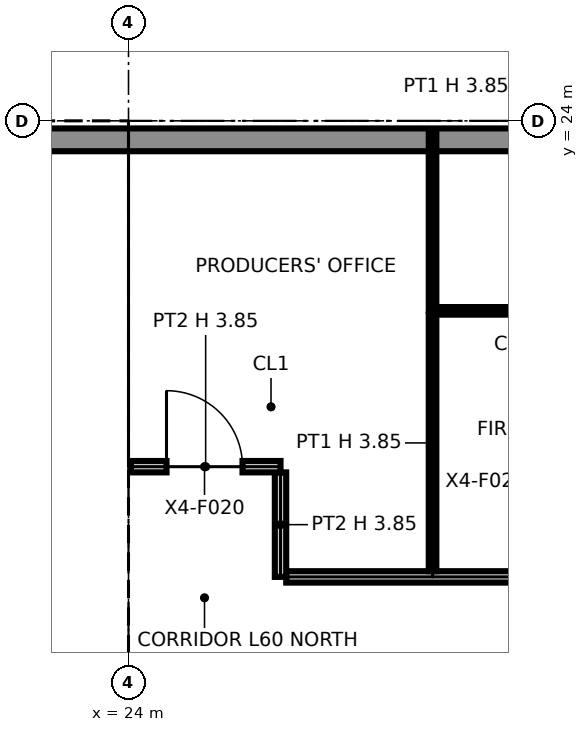
"""IFC4 building model, lengths in metres.
Left out: names, types, materials, properties, quantities, classifications, styles, units other than length and angle.
Written with IfcOpenShell. Run it as: python <this file> out.ifc"""

import sys

from ifc_helpers import new_model, si_unit, direction, frame, frame_2d, origin, origin_2d, place, context, subcontext, project, spatial, polyline, rectangle, i_section, outline, extrude, element, fill, save


model = new_model("IFC4")
c1 = context("Model", 3, precision=1e-05, world=origin(), true_north=direction((0.0, 1.0)))
c2 = subcontext(c1, "Body", "Model", "MODEL_VIEW")
j1 = project(units=[si_unit("LENGTHUNIT", "METRE"), si_unit("PLANEANGLEUNIT", "RADIAN")], contexts=[c1])
p1 = place(None, origin())
s1 = spatial("IfcSite", under=j1, at=p1, CompositionType="ELEMENT")
p2 = place(p1, origin())
s2 = spatial("IfcBuilding", under=s1, at=p2, CompositionType="ELEMENT")
p3 = place(p2, frame((0.0, 0.0, 275.0)))
s3 = spatial("IfcBuildingStorey", under=s2, at=p3, CompositionType="ELEMENT", Elevation=275.0)
p4 = place(p3, frame((24.0, 24.0, 0.0), z_axis=(0.0, 0.0, 1.0), x_axis=(1.0, 0.0, 0.0)))
e1 = element("IfcColumn", 1, at=p4, inside=s3, PredefinedType="COLUMN", context=c2, shape_type="SweptSolid", body=[
    extrude(i_section(OverallWidth=0.399, OverallDepth=0.386, WebThickness=0.021, FlangeThickness=0.033, at=origin_2d()), origin(), (0.0, 0.0, 1.0), 3.85),
])
p5 = place(p3, frame((32.0, 23.75, 0.0), z_axis=(0.0, 0.0, 1.0), x_axis=(-1.0, 0.0, 0.0)))
e2 = element("IfcWall", 2, at=p5, inside=s3, PredefinedType="SOLIDWALL", context=c2, shape_type="SweptSolid", body=[
    extrude(rectangle(XDim=25.9, YDim=0.3, at=frame_2d((12.95, 0.0))), origin(), (0.0, 0.0, 1.0), 3.85),
])
p6 = place(p3, frame((8.65, 23.25, 0.0), z_axis=(0.0, 0.0, 1.0), x_axis=(1.0, 0.0, 0.0)))
e3 = element("IfcWall", 3, at=p6, inside=s3, PredefinedType="PARTITIONING", context=c2, shape_type="SweptSolid", body=[
    extrude(outline(polyline([(0.0, 0.0), (14.7, 0.0), (14.7, 3.85), (7.438, 3.85), (7.437, 3.318), (7.263, 3.318), (7.262, 3.85), (0.0, 3.85), (0.0, 0.0)])), frame((0.0, 0.1, 0.0), z_axis=(0.0, -1.0, 0.0), x_axis=(1.0, 0.0, 0.0)), (0.0, 0.0, 1.0), 0.2),
])
p7 = place(p3, frame((8.85, 19.9, 0.0), z_axis=(0.0, 0.0, 1.0), x_axis=(1.0, 0.0, 0.0)))
e4 = element("IfcWall", 4, at=p7, inside=s3, PredefinedType="PARTITIONING", context=c2, shape_type="SweptSolid", body=[
    extrude(outline(polyline([(0.0, 0.0), (14.3, 0.0), (14.3, 3.85), (7.238, 3.85), (7.237, 3.318), (7.063, 3.318), (7.062, 3.85), (0.0, 3.85), (0.0, 0.0)])), frame((0.0, 0.1, 0.0), z_axis=(0.0, -1.0, 0.0), x_axis=(1.0, 0.0, 0.0)), (0.0, 0.0, 1.0), 0.2),
])
p8 = place(p7, frame((2.125, 0.0, 0.0)))
e5 = element("IfcOpeningElement", 5, at=p8, cuts=e4, PredefinedType="OPENING", context=c2, shape_type="SweptSolid", body=[
    extrude(rectangle(XDim=0.9, YDim=2.1, at=frame_2d((0.45, 1.05))), frame((0.0, 0.11, 0.0), z_axis=(0.0, -1.0, 0.0), x_axis=(1.0, 0.0, 0.0)), (0.0, 0.0, 1.0), 0.22),
])
p9 = place(p7, frame((5.65, 0.0, 0.0)))
e6 = element("IfcOpeningElement", 6, at=p9, cuts=e4, PredefinedType="OPENING", context=c2, shape_type="SweptSolid", body=[
    extrude(rectangle(XDim=1.1, YDim=2.1, at=frame_2d((0.55, 1.05))), frame((0.0, 0.11, 0.0), z_axis=(0.0, -1.0, 0.0), x_axis=(1.0, 0.0, 0.0)), (0.0, 0.0, 1.0), 0.22),
])
p10 = place(p7, frame((7.95, 0.0, 0.0)))
e7 = element("IfcOpeningElement", 7, at=p10, cuts=e4, PredefinedType="OPENING", context=c2, shape_type="SweptSolid", body=[
    extrude(rectangle(XDim=1.1, YDim=2.1, at=frame_2d((0.55, 1.05))), frame((0.0, 0.11, 0.0), z_axis=(0.0, -1.0, 0.0), x_axis=(1.0, 0.0, 0.0)), (0.0, 0.0, 1.0), 0.22),
])
p11 = place(p7, frame((10.25, 0.0, 0.0)))
e8 = element("IfcOpeningElement", 8, at=p11, cuts=e4, PredefinedType="OPENING", context=c2, shape_type="SweptSolid", body=[
    extrude(rectangle(XDim=1.1, YDim=2.1, at=frame_2d((0.55, 1.05))), frame((0.0, 0.11, 0.0), z_axis=(0.0, -1.0, 0.0), x_axis=(1.0, 0.0, 0.0)), (0.0, 0.0, 1.0), 0.22),
])
p12 = place(p7, frame((12.625, 0.0, 0.0)))
e9 = element("IfcOpeningElement", 9, at=p12, cuts=e4, PredefinedType="OPENING", context=c2, shape_type="SweptSolid", body=[
    extrude(rectangle(XDim=1.1, YDim=2.1, at=frame_2d((0.55, 1.05))), frame((0.0, 0.11, 0.0), z_axis=(0.0, -1.0, 0.0), x_axis=(1.0, 0.0, 0.0)), (0.0, 0.0, 1.0), 0.22),
])
p13 = place(p3, frame((23.25, 8.85, 0.0), z_axis=(0.0, 0.0, 1.0), x_axis=(0.0, 1.0, 0.0)))
e10 = element("IfcWall", 10, at=p13, inside=s3, PredefinedType="PARTITIONING", context=c2, shape_type="SweptSolid", body=[
    extrude(outline(polyline([(0.0, 0.0), (14.3, 0.0), (14.3, 3.85), (10.225, 3.85), (10.224, 3.44), (10.076, 3.44), (10.075, 3.85), (7.238, 3.85), (7.237, 3.318), (7.063, 3.318), (7.062, 3.85), (5.225, 3.85), (5.224, 3.44), (5.076, 3.44), (5.075, 3.85), (0.0, 3.85), (0.0, 0.0)])), frame((0.0, 0.1, 0.0), z_axis=(0.0, -1.0, 0.0), x_axis=(1.0, 0.0, 0.0)), (0.0, 0.0, 1.0), 0.2),
])
p14 = place(p13, frame((8.3, 0.0, 0.0)))
e11 = element("IfcOpeningElement", 11, at=p14, cuts=e10, PredefinedType="OPENING", context=c2, shape_type="SweptSolid", body=[
    extrude(rectangle(XDim=1.8, YDim=2.1, at=frame_2d((0.9, 1.05))), frame((0.0, 0.11, 0.0), z_axis=(0.0, -1.0, 0.0), x_axis=(1.0, 0.0, 0.0)), (0.0, 0.0, 1.0), 0.22),
])
p15 = place(p3, frame((26.075, 18.0, 0.0), z_axis=(0.0, 0.0, 1.0), x_axis=(1.0, 0.0, 0.0)))
e12 = element("IfcWall", 12, at=p15, inside=s3, PredefinedType="PARTITIONING", context=c2, shape_type="SweptSolid", body=[
    extrude(rectangle(XDim=12.475, YDim=0.15, at=frame_2d((6.238, 0.0))), origin(), (0.0, 0.0, 1.0), 3.85),
])
p16 = place(p15, frame((7.425, 0.0, 0.0)))
e13 = element("IfcOpeningElement", 13, at=p16, cuts=e12, PredefinedType="OPENING", context=c2, shape_type="SweptSolid", body=[
    extrude(rectangle(XDim=1.0, YDim=2.1, at=frame_2d((0.5, 1.05))), frame((0.0, 0.085, 0.0), z_axis=(0.0, -1.0, 0.0), x_axis=(1.0, 0.0, 0.0)), (0.0, 0.0, 1.0), 0.17),
])
p17 = place(p15, frame((10.7, 0.0, 0.0)))
e14 = element("IfcOpeningElement", 14, at=p17, cuts=e12, PredefinedType="OPENING", context=c2, shape_type="SweptSolid", body=[
    extrude(rectangle(XDim=1.0, YDim=2.1, at=frame_2d((0.5, 1.05))), frame((0.0, 0.085, 0.0), z_axis=(0.0, -1.0, 0.0), x_axis=(1.0, 0.0, 0.0)), (0.0, 0.0, 1.0), 0.17),
])
p18 = place(p15, frame((3.425, 0.0, 0.0)))
e15 = element("IfcOpeningElement", 15, at=p18, cuts=e12, PredefinedType="OPENING", context=c2, shape_type="SweptSolid", body=[
    extrude(rectangle(XDim=1.0, YDim=2.1, at=frame_2d((0.5, 1.05))), frame((0.0, 0.085, 0.0), z_axis=(0.0, -1.0, 0.0), x_axis=(1.0, 0.0, 0.0)), (0.0, 0.0, 1.0), 0.17),
])
p19 = place(p3, frame((26.0, 18.0, 0.0), z_axis=(0.0, 0.0, 1.0), x_axis=(0.0, 1.0, 0.0)))
e16 = element("IfcWall", 16, at=p19, inside=s3, PredefinedType="PARTITIONING", context=c2, shape_type="SweptSolid", body=[
    extrude(rectangle(XDim=1.375, YDim=0.15, at=frame_2d((0.688, 0.0))), origin(), (0.0, 0.0, 1.0), 3.85),
])
p20 = place(p3, frame((28.0, 18.075, 0.0), z_axis=(0.0, 0.0, 1.0), x_axis=(0.0, 1.0, 0.0)))
e17 = element("IfcWall", 17, at=p20, inside=s3, PredefinedType="PARTITIONING", context=c2, shape_type="SweptSolid", body=[
    extrude(outline(polyline([(0.0, 0.0), (3.375, 0.0), (3.375, 3.85), (2.225, 3.85), (2.223, 3.238), (1.627, 3.238), (1.625, 3.85), (0.0, 3.85), (0.0, 0.0)])), frame((0.0, 0.05, 0.0), z_axis=(0.0, -1.0, 0.0), x_axis=(1.0, 0.0, 0.0)), (0.0, 0.0, 1.0), 0.1),
])
p21 = place(p3, frame((24.03, 19.45, 0.0), z_axis=(0.0, 0.0, 1.0), x_axis=(1.0, 0.0, 0.0)))
e18 = element("IfcWall", 18, at=p21, inside=s3, PredefinedType="PARTITIONING", context=c2, shape_type="SweptSolid", body=[
    extrude(rectangle(XDim=1.97, YDim=0.15, at=frame_2d((0.985, 0.0))), origin(), (0.0, 0.0, 1.0), 3.85),
])
p22 = place(p21, frame((0.47, 0.0, 0.0)))
e19 = element("IfcOpeningElement", 19, at=p22, cuts=e18, PredefinedType="OPENING", context=c2, shape_type="SweptSolid", body=[
    extrude(rectangle(XDim=1.0, YDim=2.1, at=frame_2d((0.5, 1.05))), frame((0.0, 0.085, 0.0), z_axis=(0.0, -1.0, 0.0), x_axis=(1.0, 0.0, 0.0)), (0.0, 0.0, 1.0), 0.17),
])
p23 = place(p3, frame((28.05, 21.5, 0.0), z_axis=(0.0, 0.0, 1.0), x_axis=(1.0, 0.0, 0.0)))
e20 = element("IfcWall", 20, at=p23, inside=s3, PredefinedType="PARTITIONING", context=c2, shape_type="SweptSolid", body=[
    extrude(rectangle(XDim=3.92, YDim=0.1, at=frame_2d((1.96, 0.0))), origin(), (0.0, 0.0, 1.0), 3.85),
])
p24 = place(p23, frame((1.45, 0.0, 0.0)))
e21 = element("IfcOpeningElement", 21, at=p24, cuts=e20, PredefinedType="OPENING", context=c2, shape_type="SweptSolid", body=[
    extrude(rectangle(XDim=1.0, YDim=2.1, at=frame_2d((0.5, 1.05))), frame((0.0, 0.06, 0.0), z_axis=(0.0, -1.0, 0.0), x_axis=(1.0, 0.0, 0.0)), (0.0, 0.0, 1.0), 0.12),
])
p25 = place(p3, frame((28.0, 21.5, 0.0), z_axis=(0.0, 0.0, 1.0), x_axis=(0.0, 1.0, 0.0)))
e22 = element("IfcWall", 22, at=p25, inside=s3, PredefinedType="PARTITIONING", context=c2, shape_type="SweptSolid", body=[
    extrude(rectangle(XDim=2.37, YDim=0.1, at=frame_2d((1.185, 0.0))), origin(), (0.0, 0.0, 1.0), 3.85),
])
p26 = place(p14, origin())
e23 = element("IfcDoor", 23, at=p26, inside=s3, OperationType="DOUBLE_DOOR_SINGLE_SWING", PredefinedType="NOTDEFINED", context=c2, shape_type="SweptSolid", body=[
    extrude(rectangle(XDim=1.8, YDim=2.1, at=frame_2d((0.9, 1.05))), frame((0.0, 0.025, 0.0), z_axis=(0.0, -1.0, 0.0), x_axis=(1.0, 0.0, 0.0)), (0.0, 0.0, 1.0), 0.05),
])
fill(e11, e23)
p27 = place(p22, origin())
e24 = element("IfcDoor", 24, at=p27, inside=s3, OperationType="SINGLE_SWING_LEFT", PredefinedType="DOOR", context=c2, shape_type="SweptSolid", body=[
    extrude(rectangle(XDim=1.0, YDim=2.1, at=frame_2d((0.5, 1.05))), frame((0.0, 0.025, 0.0), z_axis=(0.0, -1.0, 0.0), x_axis=(1.0, 0.0, 0.0)), (0.0, 0.0, 1.0), 0.05),
])
fill(e19, e24)
save(model, sys.argv[1])
